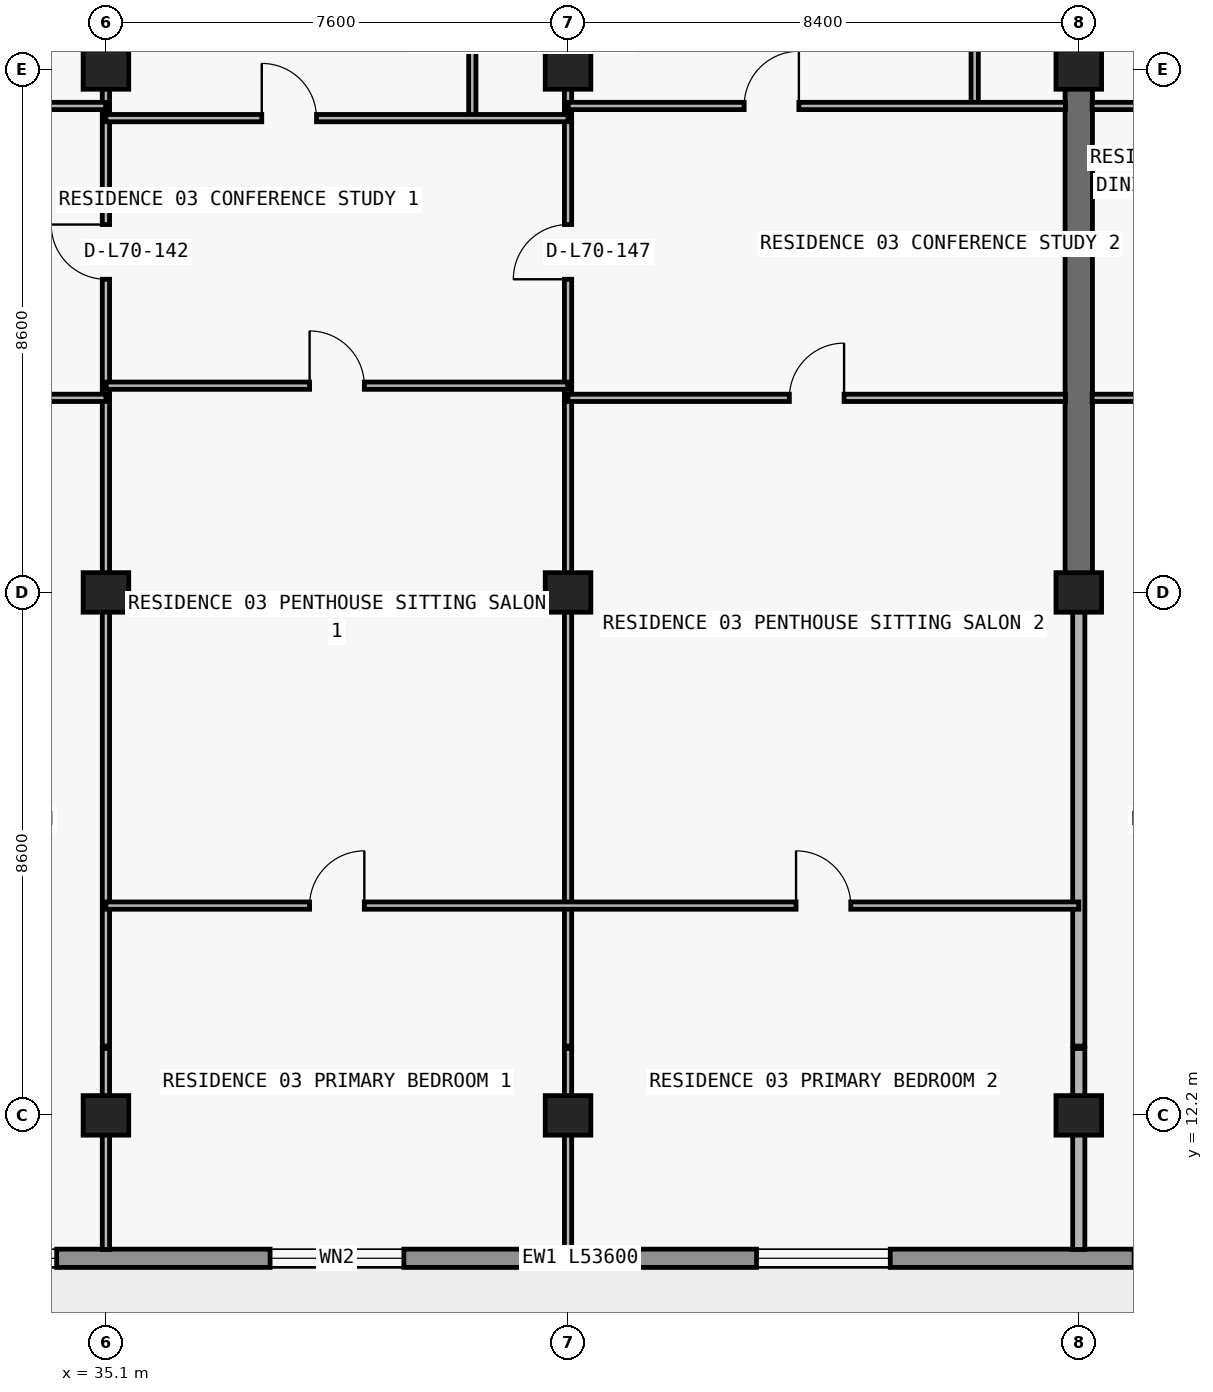
"""IFC4 building model, lengths in metres.
Left out: names, types, materials, properties, quantities, classifications, styles, units other than length and angle.
Written with IfcOpenShell. Run it as: python <this file> out.ifc"""

import sys

from ifc_helpers import new_model, si_unit, direction, frame, frame_2d, origin, origin_2d, place, context, subcontext, project, spatial, rectangle, extrude, element, fill, save


model = new_model("IFC4")
c1 = context("Model", 3, precision=1e-05, world=origin(), true_north=direction((0.0, 1.0)))
c2 = subcontext(c1, "Body", "Model", "MODEL_VIEW")
j1 = project(units=[si_unit("LENGTHUNIT", "METRE"), si_unit("PLANEANGLEUNIT", "RADIAN")], contexts=[c1])
p1 = place(None, origin())
s1 = spatial("IfcSite", under=j1, at=p1, CompositionType="ELEMENT")
p2 = place(p1, origin())
s2 = spatial("IfcBuilding", under=s1, at=p2, CompositionType="ELEMENT")
p3 = place(p2, frame((0.0, 0.0, 249.6)))
s3 = spatial("IfcBuildingStorey", under=s2, at=p3, CompositionType="ELEMENT", Elevation=249.6)
for number, where, z_axis, x_axis in (
    (1, (35.1, 12.2, 0.0), (0.0, 0.0, 1.0), (1.0, 0.0, 0.0)),
    (2, (42.7, 12.2, 0.0), (0.0, 0.0, 1.0), (1.0, 0.0, 0.0)),
    (3, (51.1, 12.2, 0.0), (0.0, 0.0, 1.0), (1.0, 0.0, 0.0)),
    (4, (35.1, 20.8, 0.0), (0.0, 0.0, 1.0), (1.0, 0.0, 0.0)),
    (5, (42.7, 20.8, 0.0), (0.0, 0.0, 1.0), (1.0, 0.0, 0.0)),
    (6, (51.1, 20.8, 0.0), (0.0, 0.0, 1.0), (1.0, 0.0, 0.0)),
    (7, (35.1, 29.4, 0.0), (0.0, 0.0, 1.0), (1.0, 0.0, 0.0)),
    (8, (42.7, 29.4, 0.0), (0.0, 0.0, 1.0), (1.0, 0.0, 0.0)),
    (9, (51.1, 29.4, 0.0), (0.0, 0.0, 1.0), (1.0, 0.0, 0.0)),
):
    element("IfcColumn", number, at=place(p3, frame(where, z_axis=z_axis, x_axis=x_axis)), inside=s3, PredefinedType="COLUMN", context=c2, shape_type="SweptSolid", body=[
        extrude(rectangle(XDim=0.75, YDim=0.65, at=origin_2d()), origin(), (0.0, 0.0, 1.0), 3.05),
    ])
p4 = place(p3, frame((51.1, 20.8, 0.0), z_axis=(0.0, 0.0, 1.0), x_axis=(0.0, 1.0, 0.0)))
e10 = element("IfcWall", 10, at=p4, inside=s3, PredefinedType="SHEAR", context=c2, shape_type="SweptSolid", body=[
    extrude(rectangle(XDim=8.6, YDim=0.45, at=frame_2d((4.3, 0.0))), origin(), (0.0, 0.0, 1.0), 3.05),
])
p5 = place(p3, frame((65.7, 9.85, 0.0), z_axis=(0.0, 0.0, 1.0), x_axis=(-1.0, 0.0, 0.0)))
e11 = element("IfcWall", 11, at=p5, inside=s3, PredefinedType="STANDARD", context=c2, shape_type="SweptSolid", body=[
    extrude(rectangle(XDim=53.6, YDim=0.3, at=frame_2d((26.8, 0.0))), origin(), (0.0, 0.0, 1.0), 3.05),
])
p6 = place(p5, frame((48.05, 0.0, 0.85)))
e12 = element("IfcOpeningElement", 12, at=p6, cuts=e11, PredefinedType="OPENING", context=c2, shape_type="SweptSolid", body=[
    extrude(rectangle(XDim=1.8, YDim=1.55, at=frame_2d((0.9, 0.775))), frame((0.0, 0.16, 0.0), z_axis=(0.0, -1.0, 0.0), x_axis=(1.0, 0.0, 0.0)), (0.0, 0.0, 1.0), 0.32),
])
p7 = place(p5, frame((44.09, 0.0, 0.0)))
e13 = element("IfcOpeningElement", 13, at=p7, cuts=e11, PredefinedType="OPENING", context=c2, shape_type="SweptSolid", body=[
    extrude(rectangle(XDim=2.0, YDim=2.3, at=frame_2d((1.0, 1.15))), frame((0.0, 0.16, 0.0), z_axis=(0.0, -1.0, 0.0), x_axis=(1.0, 0.0, 0.0)), (0.0, 0.0, 1.0), 0.32),
])
p8 = place(p5, frame((39.99, 0.0, 0.85)))
e14 = element("IfcOpeningElement", 14, at=p8, cuts=e11, PredefinedType="OPENING", context=c2, shape_type="SweptSolid", body=[
    extrude(rectangle(XDim=1.8, YDim=1.55, at=frame_2d((0.9, 0.775))), frame((0.0, 0.16, 0.0), z_axis=(0.0, -1.0, 0.0), x_axis=(1.0, 0.0, 0.0)), (0.0, 0.0, 1.0), 0.32),
])
p9 = place(p5, frame((36.09, 0.0, 0.0)))
e15 = element("IfcOpeningElement", 15, at=p9, cuts=e11, PredefinedType="OPENING", context=c2, shape_type="SweptSolid", body=[
    extrude(rectangle(XDim=2.0, YDim=2.3, at=frame_2d((1.0, 1.15))), frame((0.0, 0.16, 0.0), z_axis=(0.0, -1.0, 0.0), x_axis=(1.0, 0.0, 0.0)), (0.0, 0.0, 1.0), 0.32),
])
p10 = place(p5, frame((31.41, 0.0, 0.65)))
e16 = element("IfcOpeningElement", 16, at=p10, cuts=e11, PredefinedType="OPENING", context=c2, shape_type="SweptSolid", body=[
    extrude(rectangle(XDim=2.6, YDim=1.85, at=frame_2d((1.3, 0.925))), frame((0.0, 0.16, 0.0), z_axis=(0.0, -1.0, 0.0), x_axis=(1.0, 0.0, 0.0)), (0.0, 0.0, 1.0), 0.32),
])
p11 = place(p5, frame((25.7, 0.0, 0.85)))
e17 = element("IfcOpeningElement", 17, at=p11, cuts=e11, PredefinedType="OPENING", context=c2, shape_type="SweptSolid", body=[
    extrude(rectangle(XDim=2.2, YDim=1.55, at=frame_2d((1.1, 0.775))), frame((0.0, 0.16, 0.0), z_axis=(0.0, -1.0, 0.0), x_axis=(1.0, 0.0, 0.0)), (0.0, 0.0, 1.0), 0.32),
])
p12 = place(p5, frame((17.7, 0.0, 0.85)))
e18 = element("IfcOpeningElement", 18, at=p12, cuts=e11, PredefinedType="OPENING", context=c2, shape_type="SweptSolid", body=[
    extrude(rectangle(XDim=2.2, YDim=1.55, at=frame_2d((1.1, 0.775))), frame((0.0, 0.16, 0.0), z_axis=(0.0, -1.0, 0.0), x_axis=(1.0, 0.0, 0.0)), (0.0, 0.0, 1.0), 0.32),
])
p13 = place(p5, frame((11.69, 0.0, 0.0)))
e19 = element("IfcOpeningElement", 19, at=p13, cuts=e11, PredefinedType="OPENING", context=c2, shape_type="SweptSolid", body=[
    extrude(rectangle(XDim=2.0, YDim=2.3, at=frame_2d((1.0, 1.15))), frame((0.0, 0.16, 0.0), z_axis=(0.0, -1.0, 0.0), x_axis=(1.0, 0.0, 0.0)), (0.0, 0.0, 1.0), 0.32),
])
p14 = place(p5, frame((7.01, 0.0, 0.65)))
e20 = element("IfcOpeningElement", 20, at=p14, cuts=e11, PredefinedType="OPENING", context=c2, shape_type="SweptSolid", body=[
    extrude(rectangle(XDim=2.6, YDim=1.85, at=frame_2d((1.3, 0.925))), frame((0.0, 0.16, 0.0), z_axis=(0.0, -1.0, 0.0), x_axis=(1.0, 0.0, 0.0)), (0.0, 0.0, 1.0), 0.32),
])
p15 = place(p5, frame((2.0, 0.0, 0.85)))
e21 = element("IfcOpeningElement", 21, at=p15, cuts=e11, PredefinedType="OPENING", context=c2, shape_type="SweptSolid", body=[
    extrude(rectangle(XDim=2.2, YDim=1.55, at=frame_2d((1.1, 0.775))), frame((0.0, 0.16, 0.0), z_axis=(0.0, -1.0, 0.0), x_axis=(1.0, 0.0, 0.0)), (0.0, 0.0, 1.0), 0.32),
])
p16 = place(p3, frame((35.1, 9.995, 0.0), z_axis=(0.0, 0.0, 1.0), x_axis=(0.0, 1.0, 0.0)))
e22 = element("IfcWall", 22, at=p16, inside=s3, PredefinedType="PARTITIONING", context=c2, shape_type="SweptSolid", body=[
    extrude(rectangle(XDim=3.305, YDim=0.12, at=frame_2d((1.652, 0.0))), origin(), (0.0, 0.0, 1.0), 2.263),
])
p17 = place(p3, frame((35.1, 13.34, 0.0), z_axis=(0.0, 0.0, 1.0), x_axis=(0.0, 1.0, 0.0)))
e23 = element("IfcWall", 23, at=p17, inside=s3, PredefinedType="PARTITIONING", context=c2, shape_type="SweptSolid", body=[
    extrude(rectangle(XDim=16.8, YDim=0.12, at=frame_2d((8.4, 0.0))), origin(), (0.0, 0.0, 1.0), 2.263),
])
p18 = place(p17, frame((12.61, 0.0, 0.0)))
e24 = element("IfcOpeningElement", 24, at=p18, cuts=e23, PredefinedType="OPENING", context=c2, shape_type="SweptSolid", body=[
    extrude(rectangle(XDim=0.9, YDim=2.15, at=frame_2d((0.45, 1.075))), frame((0.0, 0.07, 0.0), z_axis=(0.0, -1.0, 0.0), x_axis=(1.0, 0.0, 0.0)), (0.0, 0.0, 1.0), 0.14),
])
p19 = place(p3, frame((41.126, 28.6, 0.0), z_axis=(0.0, 0.0, 1.0), x_axis=(0.0, 1.0, 0.0)))
e25 = element("IfcWall", 25, at=p19, inside=s3, PredefinedType="PARTITIONING", context=c2, shape_type="SweptSolid", body=[
    extrude(rectangle(XDim=1.54, YDim=0.12, at=frame_2d((0.77, 0.0))), origin(), (0.0, 0.0, 1.0), 3.05),
])
p20 = place(p3, frame((42.7, 9.995, 0.0), z_axis=(0.0, 0.0, 1.0), x_axis=(0.0, 1.0, 0.0)))
e26 = element("IfcWall", 26, at=p20, inside=s3, PredefinedType="PARTITIONING", context=c2, shape_type="SweptSolid", body=[
    extrude(rectangle(XDim=3.305, YDim=0.12, at=frame_2d((1.652, 0.0))), origin(), (0.0, 0.0, 1.0), 2.263),
])
p21 = place(p3, frame((42.7, 13.34, 0.0), z_axis=(0.0, 0.0, 1.0), x_axis=(0.0, 1.0, 0.0)))
e27 = element("IfcWall", 27, at=p21, inside=s3, PredefinedType="PARTITIONING", context=c2, shape_type="SweptSolid", body=[
    extrude(rectangle(XDim=16.8, YDim=0.12, at=frame_2d((8.4, 0.0))), origin(), (0.0, 0.0, 1.0), 2.263),
])
p22 = place(p21, frame((12.61, 0.0, 0.0)))
e28 = element("IfcOpeningElement", 28, at=p22, cuts=e27, PredefinedType="OPENING", context=c2, shape_type="SweptSolid", body=[
    extrude(rectangle(XDim=0.9, YDim=2.15, at=frame_2d((0.45, 1.075))), frame((0.0, 0.07, 0.0), z_axis=(0.0, -1.0, 0.0), x_axis=(1.0, 0.0, 0.0)), (0.0, 0.0, 1.0), 0.14),
])
p23 = place(p3, frame((49.388, 28.8, 0.0), z_axis=(0.0, 0.0, 1.0), x_axis=(0.0, 1.0, 0.0)))
e29 = element("IfcWall", 29, at=p23, inside=s3, PredefinedType="PARTITIONING", context=c2, shape_type="SweptSolid", body=[
    extrude(rectangle(XDim=1.34, YDim=0.12, at=frame_2d((0.67, 0.0))), origin(), (0.0, 0.0, 1.0), 3.05),
])
p24 = place(p3, frame((51.1, 9.995, 0.0), z_axis=(0.0, 0.0, 1.0), x_axis=(0.0, 1.0, 0.0)))
e30 = element("IfcWall", 30, at=p24, inside=s3, PredefinedType="PARTITIONING", context=c2, shape_type="SweptSolid", body=[
    extrude(rectangle(XDim=3.305, YDim=0.2, at=frame_2d((1.652, 0.0))), origin(), (0.0, 0.0, 1.0), 2.263),
])
p25 = place(p3, frame((51.1, 13.34, 0.0), z_axis=(0.0, 0.0, 1.0), x_axis=(0.0, 1.0, 0.0)))
e31 = element("IfcWall", 31, at=p25, inside=s3, PredefinedType="PARTITIONING", context=c2, shape_type="SweptSolid", body=[
    extrude(rectangle(XDim=7.455, YDim=0.2, at=frame_2d((3.728, 0.0))), origin(), (0.0, 0.0, 1.0), 2.263),
])
p26 = place(p3, frame((51.1, 29.405, 0.0), z_axis=(0.0, 0.0, 1.0), x_axis=(0.0, 1.0, 0.0)))
e32 = element("IfcWall", 32, at=p26, inside=s3, PredefinedType="PARTITIONING", context=c2, shape_type="SweptSolid", body=[
    extrude(rectangle(XDim=0.735, YDim=0.2, at=frame_2d((0.367, 0.0))), origin(), (0.0, 0.0, 1.0), 2.335),
])
p27 = place(p3, frame((35.1, 15.65, 0.0), z_axis=(0.0, 0.0, 1.0), x_axis=(1.0, 0.0, 0.0)))
e33 = element("IfcWall", 33, at=p27, inside=s3, PredefinedType="PARTITIONING", context=c2, shape_type="SweptSolid", body=[
    extrude(rectangle(XDim=16.0, YDim=0.12, at=frame_2d((8.0, 0.0))), origin(), (0.0, 0.0, 1.0), 3.05),
])
p28 = place(p27, frame((3.35, 0.0, 0.0)))
e34 = element("IfcOpeningElement", 34, at=p28, cuts=e33, PredefinedType="OPENING", context=c2, shape_type="SweptSolid", body=[
    extrude(rectangle(XDim=0.9, YDim=2.15, at=frame_2d((0.45, 1.075))), frame((0.0, 0.07, 0.0), z_axis=(0.0, -1.0, 0.0), x_axis=(1.0, 0.0, 0.0)), (0.0, 0.0, 1.0), 0.14),
])
p29 = place(p27, frame((11.35, 0.0, 0.0)))
e35 = element("IfcOpeningElement", 35, at=p29, cuts=e33, PredefinedType="OPENING", context=c2, shape_type="SweptSolid", body=[
    extrude(rectangle(XDim=0.9, YDim=2.15, at=frame_2d((0.45, 1.075))), frame((0.0, 0.07, 0.0), z_axis=(0.0, -1.0, 0.0), x_axis=(1.0, 0.0, 0.0)), (0.0, 0.0, 1.0), 0.14),
])
p30 = place(p3, frame((26.92, 24.0, 0.0), z_axis=(0.0, 0.0, 1.0), x_axis=(1.0, 0.0, 0.0)))
e36 = element("IfcWall", 36, at=p30, inside=s3, PredefinedType="PARTITIONING", context=c2, shape_type="SweptSolid", body=[
    extrude(rectangle(XDim=8.18, YDim=0.12, at=frame_2d((4.09, 0.0))), origin(), (0.0, 0.0, 1.0), 3.05),
])
p31 = place(p30, frame((1.33, 0.0, 0.0)))
e37 = element("IfcOpeningElement", 37, at=p31, cuts=e36, PredefinedType="OPENING", context=c2, shape_type="SweptSolid", body=[
    extrude(rectangle(XDim=0.9, YDim=2.15, at=frame_2d((0.45, 1.075))), frame((0.0, 0.07, 0.0), z_axis=(0.0, -1.0, 0.0), x_axis=(1.0, 0.0, 0.0)), (0.0, 0.0, 1.0), 0.14),
])
p32 = place(p3, frame((42.7, 24.0, 0.0), z_axis=(0.0, 0.0, 1.0), x_axis=(1.0, 0.0, 0.0)))
e38 = element("IfcWall", 38, at=p32, inside=s3, PredefinedType="PARTITIONING", context=c2, shape_type="SweptSolid", body=[
    extrude(rectangle(XDim=8.18, YDim=0.12, at=frame_2d((4.09, 0.0))), origin(), (0.0, 0.0, 1.0), 3.05),
])
p33 = place(p32, frame((3.64, 0.0, 0.0)))
e39 = element("IfcOpeningElement", 39, at=p33, cuts=e38, PredefinedType="OPENING", context=c2, shape_type="SweptSolid", body=[
    extrude(rectangle(XDim=0.9, YDim=2.15, at=frame_2d((0.45, 1.075))), frame((0.0, 0.07, 0.0), z_axis=(0.0, -1.0, 0.0), x_axis=(1.0, 0.0, 0.0)), (0.0, 0.0, 1.0), 0.14),
])
p34 = place(p3, frame((51.32, 24.0, 0.0), z_axis=(0.0, 0.0, 1.0), x_axis=(1.0, 0.0, 0.0)))
e40 = element("IfcWall", 40, at=p34, inside=s3, PredefinedType="PARTITIONING", context=c2, shape_type="SweptSolid", body=[
    extrude(rectangle(XDim=8.18, YDim=0.12, at=frame_2d((4.09, 0.0))), origin(), (0.0, 0.0, 1.0), 3.05),
])
p35 = place(p34, frame((1.204, 0.0, 0.0)))
e41 = element("IfcOpeningElement", 41, at=p35, cuts=e40, PredefinedType="OPENING", context=c2, shape_type="SweptSolid", body=[
    extrude(rectangle(XDim=0.9, YDim=2.15, at=frame_2d((0.45, 1.075))), frame((0.0, 0.07, 0.0), z_axis=(0.0, -1.0, 0.0), x_axis=(1.0, 0.0, 0.0)), (0.0, 0.0, 1.0), 0.14),
])
p36 = place(p3, frame((35.105, 24.2, 0.0), z_axis=(0.0, 0.0, 1.0), x_axis=(1.0, 0.0, 0.0)))
e42 = element("IfcWall", 42, at=p36, inside=s3, PredefinedType="PARTITIONING", context=c2, shape_type="SweptSolid", body=[
    extrude(rectangle(XDim=7.59, YDim=0.12, at=frame_2d((3.795, 0.0))), origin(), (0.0, 0.0, 1.0), 3.05),
])
p37 = place(p36, frame((3.345, 0.0, 0.0)))
e43 = element("IfcOpeningElement", 43, at=p37, cuts=e42, PredefinedType="OPENING", context=c2, shape_type="SweptSolid", body=[
    extrude(rectangle(XDim=0.9, YDim=2.15, at=frame_2d((0.45, 1.075))), frame((0.0, 0.07, 0.0), z_axis=(0.0, -1.0, 0.0), x_axis=(1.0, 0.0, 0.0)), (0.0, 0.0, 1.0), 0.14),
])
p38 = place(p3, frame((35.1, 28.6, 0.0), z_axis=(0.0, 0.0, 1.0), x_axis=(1.0, 0.0, 0.0)))
e44 = element("IfcWall", 44, at=p38, inside=s3, PredefinedType="PARTITIONING", context=c2, shape_type="SweptSolid", body=[
    extrude(rectangle(XDim=7.6, YDim=0.12, at=frame_2d((3.8, 0.0))), origin(), (0.0, 0.0, 1.0), 3.05),
])
p39 = place(p38, frame((2.563, 0.0, 0.0)))
e45 = element("IfcOpeningElement", 45, at=p39, cuts=e44, PredefinedType="OPENING", context=c2, shape_type="SweptSolid", body=[
    extrude(rectangle(XDim=0.9, YDim=2.15, at=frame_2d((0.45, 1.075))), frame((0.0, 0.07, 0.0), z_axis=(0.0, -1.0, 0.0), x_axis=(1.0, 0.0, 0.0)), (0.0, 0.0, 1.0), 0.14),
])
p40 = place(p3, frame((26.92, 28.8, 0.0), z_axis=(0.0, 0.0, 1.0), x_axis=(1.0, 0.0, 0.0)))
e46 = element("IfcWall", 46, at=p40, inside=s3, PredefinedType="PARTITIONING", context=c2, shape_type="SweptSolid", body=[
    extrude(rectangle(XDim=8.175, YDim=0.12, at=frame_2d((4.087, 0.0))), origin(), (0.0, 0.0, 1.0), 3.05),
])
p41 = place(p40, frame((1.33, 0.0, 0.0)))
e47 = element("IfcOpeningElement", 47, at=p41, cuts=e46, PredefinedType="OPENING", context=c2, shape_type="SweptSolid", body=[
    extrude(rectangle(XDim=0.9, YDim=2.15, at=frame_2d((0.45, 1.075))), frame((0.0, 0.07, 0.0), z_axis=(0.0, -1.0, 0.0), x_axis=(1.0, 0.0, 0.0)), (0.0, 0.0, 1.0), 0.14),
])
p42 = place(p3, frame((42.705, 28.8, 0.0), z_axis=(0.0, 0.0, 1.0), x_axis=(1.0, 0.0, 0.0)))
e48 = element("IfcWall", 48, at=p42, inside=s3, PredefinedType="PARTITIONING", context=c2, shape_type="SweptSolid", body=[
    extrude(rectangle(XDim=8.175, YDim=0.12, at=frame_2d((4.087, 0.0))), origin(), (0.0, 0.0, 1.0), 3.05),
])
p43 = place(p42, frame((2.892, 0.0, 0.0)))
e49 = element("IfcOpeningElement", 49, at=p43, cuts=e48, PredefinedType="OPENING", context=c2, shape_type="SweptSolid", body=[
    extrude(rectangle(XDim=0.9, YDim=2.15, at=frame_2d((0.45, 1.075))), frame((0.0, 0.07, 0.0), z_axis=(0.0, -1.0, 0.0), x_axis=(1.0, 0.0, 0.0)), (0.0, 0.0, 1.0), 0.14),
])
p44 = place(p3, frame((51.32, 28.8, 0.0), z_axis=(0.0, 0.0, 1.0), x_axis=(1.0, 0.0, 0.0)))
e50 = element("IfcWall", 50, at=p44, inside=s3, PredefinedType="PARTITIONING", context=c2, shape_type="SweptSolid", body=[
    extrude(rectangle(XDim=8.175, YDim=0.12, at=frame_2d((4.087, 0.0))), origin(), (0.0, 0.0, 1.0), 3.05),
])
p45 = place(p44, frame((1.204, 0.0, 0.0)))
e51 = element("IfcOpeningElement", 51, at=p45, cuts=e50, PredefinedType="OPENING", context=c2, shape_type="SweptSolid", body=[
    extrude(rectangle(XDim=0.9, YDim=2.15, at=frame_2d((0.45, 1.075))), frame((0.0, 0.07, 0.0), z_axis=(0.0, -1.0, 0.0), x_axis=(1.0, 0.0, 0.0)), (0.0, 0.0, 1.0), 0.14),
])
p46 = place(p10, origin())
e52 = element("IfcWindow", 52, at=p46, inside=s3, PartitioningType="SINGLE_PANEL", PredefinedType="WINDOW", context=c2, shape_type="SweptSolid", body=[
    extrude(rectangle(XDim=2.6, YDim=1.85, at=frame_2d((1.3, 0.925))), frame((0.0, 0.03, 0.0), z_axis=(0.0, -1.0, 0.0), x_axis=(1.0, 0.0, 0.0)), (0.0, 0.0, 1.0), 0.06),
])
fill(e16, e52)
p47 = place(p11, origin())
e53 = element("IfcWindow", 53, at=p47, inside=s3, PartitioningType="SINGLE_PANEL", PredefinedType="WINDOW", context=c2, shape_type="SweptSolid", body=[
    extrude(rectangle(XDim=2.2, YDim=1.55, at=frame_2d((1.1, 0.775))), frame((0.0, 0.03, 0.0), z_axis=(0.0, -1.0, 0.0), x_axis=(1.0, 0.0, 0.0)), (0.0, 0.0, 1.0), 0.06),
])
fill(e17, e53)
p48 = place(p12, origin())
e54 = element("IfcWindow", 54, at=p48, inside=s3, PartitioningType="SINGLE_PANEL", PredefinedType="WINDOW", context=c2, shape_type="SweptSolid", body=[
    extrude(rectangle(XDim=2.2, YDim=1.55, at=frame_2d((1.1, 0.775))), frame((0.0, 0.03, 0.0), z_axis=(0.0, -1.0, 0.0), x_axis=(1.0, 0.0, 0.0)), (0.0, 0.0, 1.0), 0.06),
])
fill(e18, e54)
p49 = place(p18, origin())
e55 = element("IfcDoor", 55, at=p49, inside=s3, OperationType="SINGLE_SWING_RIGHT", PredefinedType="DOOR", context=c2, shape_type="SweptSolid", body=[
    extrude(rectangle(XDim=0.9, YDim=2.15, at=frame_2d((0.45, 1.075))), frame((0.0, 0.025, 0.0), z_axis=(0.0, -1.0, 0.0), x_axis=(1.0, 0.0, 0.0)), (0.0, 0.0, 1.0), 0.05),
])
fill(e24, e55)
p50 = place(p39, origin())
e56 = element("IfcDoor", 56, at=p50, inside=s3, OperationType="SINGLE_SWING_LEFT", PredefinedType="DOOR", context=c2, shape_type="SweptSolid", body=[
    extrude(rectangle(XDim=0.9, YDim=2.15, at=frame_2d((0.45, 1.075))), frame((0.0, 0.025, 0.0), z_axis=(0.0, -1.0, 0.0), x_axis=(1.0, 0.0, 0.0)), (0.0, 0.0, 1.0), 0.05),
])
fill(e45, e56)
p51 = place(p37, origin())
e57 = element("IfcDoor", 57, at=p51, inside=s3, OperationType="SINGLE_SWING_LEFT", PredefinedType="DOOR", context=c2, shape_type="SweptSolid", body=[
    extrude(rectangle(XDim=0.9, YDim=2.15, at=frame_2d((0.45, 1.075))), frame((0.0, 0.025, 0.0), z_axis=(0.0, -1.0, 0.0), x_axis=(1.0, 0.0, 0.0)), (0.0, 0.0, 1.0), 0.05),
])
fill(e43, e57)
p52 = place(p28, origin())
e58 = element("IfcDoor", 58, at=p52, inside=s3, OperationType="SINGLE_SWING_RIGHT", PredefinedType="DOOR", context=c2, shape_type="SweptSolid", body=[
    extrude(rectangle(XDim=0.9, YDim=2.15, at=frame_2d((0.45, 1.075))), frame((0.0, 0.025, 0.0), z_axis=(0.0, -1.0, 0.0), x_axis=(1.0, 0.0, 0.0)), (0.0, 0.0, 1.0), 0.05),
])
fill(e34, e58)
p53 = place(p22, origin())
e59 = element("IfcDoor", 59, at=p53, inside=s3, OperationType="SINGLE_SWING_LEFT", PredefinedType="DOOR", context=c2, shape_type="SweptSolid", body=[
    extrude(rectangle(XDim=0.9, YDim=2.15, at=frame_2d((0.45, 1.075))), frame((0.0, 0.025, 0.0), z_axis=(0.0, -1.0, 0.0), x_axis=(1.0, 0.0, 0.0)), (0.0, 0.0, 1.0), 0.05),
])
fill(e28, e59)
p54 = place(p43, origin())
e60 = element("IfcDoor", 60, at=p54, inside=s3, OperationType="SINGLE_SWING_RIGHT", PredefinedType="DOOR", context=c2, shape_type="SweptSolid", body=[
    extrude(rectangle(XDim=0.9, YDim=2.15, at=frame_2d((0.45, 1.075))), frame((0.0, 0.025, 0.0), z_axis=(0.0, -1.0, 0.0), x_axis=(1.0, 0.0, 0.0)), (0.0, 0.0, 1.0), 0.05),
])
fill(e49, e60)
p55 = place(p33, origin())
e61 = element("IfcDoor", 61, at=p55, inside=s3, OperationType="SINGLE_SWING_RIGHT", PredefinedType="DOOR", context=c2, shape_type="SweptSolid", body=[
    extrude(rectangle(XDim=0.9, YDim=2.15, at=frame_2d((0.45, 1.075))), frame((0.0, 0.025, 0.0), z_axis=(0.0, -1.0, 0.0), x_axis=(1.0, 0.0, 0.0)), (0.0, 0.0, 1.0), 0.05),
])
fill(e39, e61)
p56 = place(p29, origin())
e62 = element("IfcDoor", 62, at=p56, inside=s3, OperationType="SINGLE_SWING_LEFT", PredefinedType="DOOR", context=c2, shape_type="SweptSolid", body=[
    extrude(rectangle(XDim=0.9, YDim=2.15, at=frame_2d((0.45, 1.075))), frame((0.0, 0.025, 0.0), z_axis=(0.0, -1.0, 0.0), x_axis=(1.0, 0.0, 0.0)), (0.0, 0.0, 1.0), 0.05),
])
fill(e35, e62)
save(model, sys.argv[1])
